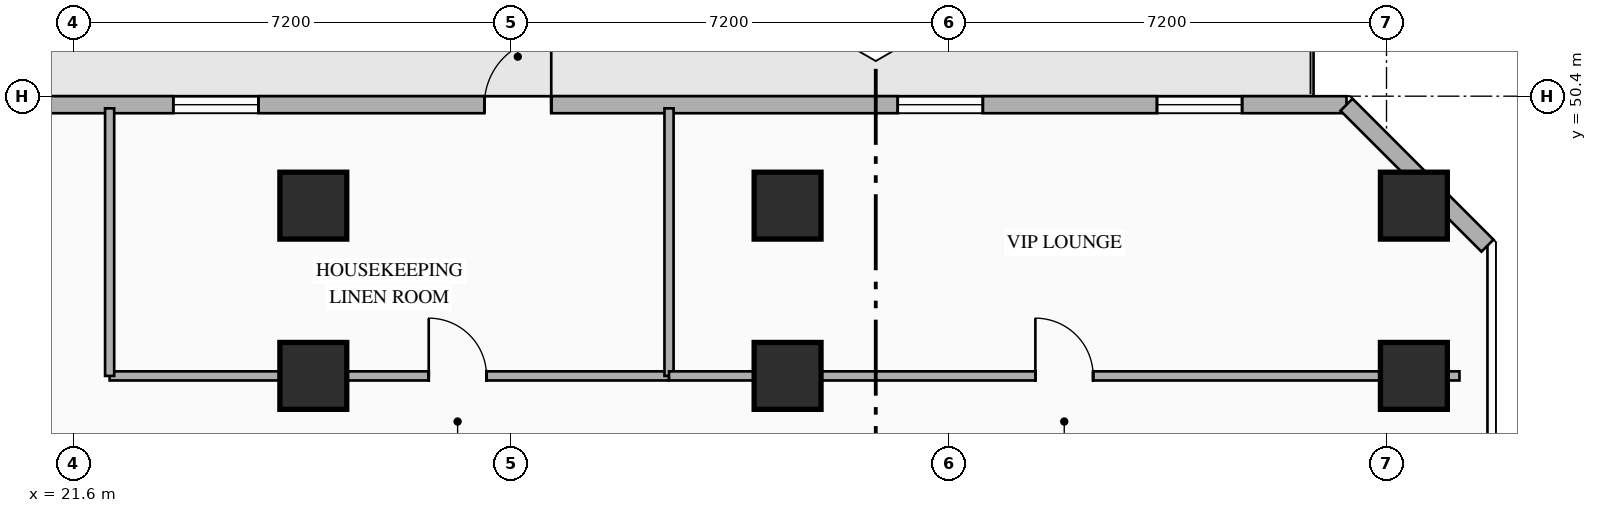
"""IFC4 building model, lengths in metres.
Left out: names, types, materials, properties, quantities, classifications, styles, units other than length and angle.
Written with IfcOpenShell. Run it as: python <this file> out.ifc"""

import sys

from ifc_helpers import new_model, si_unit, direction, frame, frame_2d, origin, origin_2d, place, context, subcontext, project, spatial, rectangle, hollow_rectangle, extrude, element, fill, save


model = new_model("IFC4")
c1 = context("Model", 3, precision=1e-05, world=origin(), true_north=direction((0.0, 1.0)))
c2 = subcontext(c1, "Body", "Model", "MODEL_VIEW")
j1 = project(units=[si_unit("LENGTHUNIT", "METRE"), si_unit("PLANEANGLEUNIT", "RADIAN")], contexts=[c1])
p1 = place(None, origin())
s1 = spatial("IfcSite", under=j1, at=p1, CompositionType="ELEMENT")
p2 = place(p1, origin())
s2 = spatial("IfcBuilding", under=s1, at=p2, CompositionType="ELEMENT")
p3 = place(p2, frame((0.0, 0.0, 36.6)))
s3 = spatial("IfcBuildingStorey", under=s2, at=p3, CompositionType="ELEMENT", Elevation=36.6)
for number, where, z_axis, x_axis in (
    (1, (25.55, 45.8, 0.0), (0.0, 0.0, 1.0), (1.0, 0.0, 0.0)),
    (2, (33.35, 45.8, 0.0), (0.0, 0.0, 1.0), (1.0, 0.0, 0.0)),
    (3, (43.65, 45.8, 0.0), (0.0, 0.0, 1.0), (1.0, 0.0, 0.0)),
    (4, (25.55, 48.6, 0.0), (0.0, 0.0, 1.0), (1.0, 0.0, 0.0)),
    (5, (33.35, 48.6, 0.0), (0.0, 0.0, 1.0), (1.0, 0.0, 0.0)),
    (6, (43.65, 48.6, 0.0), (0.0, 0.0, 1.0), (1.0, 0.0, 0.0)),
):
    element("IfcColumn", number, at=place(p3, frame(where, z_axis=z_axis, x_axis=x_axis)), inside=s3, PredefinedType="COLUMN", context=c2, shape_type="SweptSolid", body=[
        extrude(hollow_rectangle(XDim=1.1, YDim=1.1, WallThickness=0.04, at=origin_2d()), origin(), (0.0, 0.0, 1.0), 3.35),
    ])
p4 = place(p3, frame((2.458, 50.26, 0.0), z_axis=(0.0, 0.0, 1.0), x_axis=(1.0, 0.0, 0.0)))
e7 = element("IfcWall", 7, at=p4, inside=s3, PredefinedType="STANDARD", context=c2, shape_type="SweptSolid", body=[
    extrude(rectangle(XDim=40.084, YDim=0.28, at=frame_2d((20.042, 0.0))), origin(), (0.0, 0.0, 1.0), 3.13),
])
p5 = place(p4, frame((25.905, 0.0, 0.0)))
e8 = element("IfcOpeningElement", 8, at=p5, cuts=e7, PredefinedType="OPENING", context=c2, shape_type="SweptSolid", body=[
    extrude(rectangle(XDim=1.1, YDim=2.2, at=frame_2d((0.55, 1.1))), frame((0.0, 0.15, 0.0), z_axis=(0.0, -1.0, 0.0), x_axis=(1.0, 0.0, 0.0)), (0.0, 0.0, 1.0), 0.3),
])
p6 = place(p4, frame((1.717, 0.0, 0.85)))
e9 = element("IfcOpeningElement", 9, at=p6, cuts=e7, PredefinedType="OPENING", context=c2, shape_type="SweptSolid", body=[
    extrude(rectangle(XDim=1.4, YDim=1.8, at=frame_2d((0.7, 0.9))), frame((0.0, 0.15, 0.0), z_axis=(0.0, -1.0, 0.0), x_axis=(1.0, 0.0, 0.0)), (0.0, 0.0, 1.0), 0.3),
])
p7 = place(p4, frame((5.981, 0.0, 0.85)))
e10 = element("IfcOpeningElement", 10, at=p7, cuts=e7, PredefinedType="OPENING", context=c2, shape_type="SweptSolid", body=[
    extrude(rectangle(XDim=1.4, YDim=1.8, at=frame_2d((0.7, 0.9))), frame((0.0, 0.15, 0.0), z_axis=(0.0, -1.0, 0.0), x_axis=(1.0, 0.0, 0.0)), (0.0, 0.0, 1.0), 0.3),
])
p8 = place(p4, frame((11.261, 0.0, 0.85)))
e11 = element("IfcOpeningElement", 11, at=p8, cuts=e7, PredefinedType="OPENING", context=c2, shape_type="SweptSolid", body=[
    extrude(rectangle(XDim=1.4, YDim=1.8, at=frame_2d((0.7, 0.9))), frame((0.0, 0.15, 0.0), z_axis=(0.0, -1.0, 0.0), x_axis=(1.0, 0.0, 0.0)), (0.0, 0.0, 1.0), 0.3),
])
p9 = place(p4, frame((14.02, 0.0, 0.85)))
e12 = element("IfcOpeningElement", 12, at=p9, cuts=e7, PredefinedType="OPENING", context=c2, shape_type="SweptSolid", body=[
    extrude(rectangle(XDim=1.4, YDim=1.8, at=frame_2d((0.7, 0.9))), frame((0.0, 0.15, 0.0), z_axis=(0.0, -1.0, 0.0), x_axis=(1.0, 0.0, 0.0)), (0.0, 0.0, 1.0), 0.3),
])
p10 = place(p4, frame((20.789, 0.0, 0.85)))
e13 = element("IfcOpeningElement", 13, at=p10, cuts=e7, PredefinedType="OPENING", context=c2, shape_type="SweptSolid", body=[
    extrude(rectangle(XDim=1.4, YDim=1.8, at=frame_2d((0.7, 0.9))), frame((0.0, 0.15, 0.0), z_axis=(0.0, -1.0, 0.0), x_axis=(1.0, 0.0, 0.0)), (0.0, 0.0, 1.0), 0.3),
])
p11 = place(p4, frame((32.703, 0.0, 0.85)))
e14 = element("IfcOpeningElement", 14, at=p11, cuts=e7, PredefinedType="OPENING", context=c2, shape_type="SweptSolid", body=[
    extrude(rectangle(XDim=1.4, YDim=1.8, at=frame_2d((0.7, 0.9))), frame((0.0, 0.15, 0.0), z_axis=(0.0, -1.0, 0.0), x_axis=(1.0, 0.0, 0.0)), (0.0, 0.0, 1.0), 0.3),
])
p12 = place(p4, frame((36.967, 0.0, 0.85)))
e15 = element("IfcOpeningElement", 15, at=p12, cuts=e7, PredefinedType="OPENING", context=c2, shape_type="SweptSolid", body=[
    extrude(rectangle(XDim=1.4, YDim=1.8, at=frame_2d((0.7, 0.9))), frame((0.0, 0.15, 0.0), z_axis=(0.0, -1.0, 0.0), x_axis=(1.0, 0.0, 0.0)), (0.0, 0.0, 1.0), 0.3),
])
p13 = place(p3, frame((42.542, 50.26, 0.0), z_axis=(0.0, 0.0, 1.0), x_axis=(0.707106781187, -0.707106781187, 0.0)))
e16 = element("IfcWall", 16, at=p13, inside=s3, PredefinedType="STANDARD", context=c2, shape_type="SweptSolid", body=[
    extrude(rectangle(XDim=3.278, YDim=0.28, at=frame_2d((1.639, 0.0))), origin(), (0.0, 0.0, 1.0), 3.13),
])
p14 = place(p3, frame((22.2, 45.8, 0.0), z_axis=(0.0, 0.0, 1.0), x_axis=(1.0, 0.0, 0.0)))
e17 = element("IfcWall", 17, at=p14, inside=s3, PredefinedType="PARTITIONING", context=c2, shape_type="SweptSolid", body=[
    extrude(rectangle(XDim=9.2, YDim=0.15, at=frame_2d((4.6, 0.0))), origin(), (0.0, 0.0, 1.0), 2.425),
])
p15 = place(p14, frame((5.248, 0.0, 0.0)))
e18 = element("IfcOpeningElement", 18, at=p15, cuts=e17, PredefinedType="OPENING", context=c2, shape_type="SweptSolid", body=[
    extrude(rectangle(XDim=0.95, YDim=2.15, at=frame_2d((0.475, 1.075))), frame((0.0, 0.085, 0.0), z_axis=(0.0, -1.0, 0.0), x_axis=(1.0, 0.0, 0.0)), (0.0, 0.0, 1.0), 0.17),
])
for number, where, z_axis, x_axis in (
    (19, (22.2, 45.8, 0.0), (0.0, 0.0, 1.0), (0.0, 1.0, 0.0)),
    (20, (31.4, 45.8, 0.0), (0.0, 0.0, 1.0), (0.0, 1.0, 0.0)),
):
    element("IfcWall", number, at=place(p3, frame(where, z_axis=z_axis, x_axis=x_axis)), inside=s3, PredefinedType="PARTITIONING", context=c2, shape_type="SweptSolid", body=[
        extrude(rectangle(XDim=4.4, YDim=0.15, at=frame_2d((2.2, 0.0))), origin(), (0.0, 0.0, 1.0), 3.13),
    ])
p16 = place(p3, frame((31.4, 45.8, 0.0), z_axis=(0.0, 0.0, 1.0), x_axis=(1.0, 0.0, 0.0)))
e21 = element("IfcWall", 21, at=p16, inside=s3, PredefinedType="PARTITIONING", context=c2, shape_type="SweptSolid", body=[
    extrude(rectangle(XDim=13.0, YDim=0.15, at=frame_2d((6.5, 0.0))), origin(), (0.0, 0.0, 1.0), 2.425),
])
p17 = place(p16, frame((6.025, 0.0, 0.0)))
e22 = element("IfcOpeningElement", 22, at=p17, cuts=e21, PredefinedType="OPENING", context=c2, shape_type="SweptSolid", body=[
    extrude(rectangle(XDim=0.95, YDim=2.15, at=frame_2d((0.475, 1.075))), frame((0.0, 0.085, 0.0), z_axis=(0.0, -1.0, 0.0), x_axis=(1.0, 0.0, 0.0)), (0.0, 0.0, 1.0), 0.17),
])
p18 = place(p5, origin())
e23 = element("IfcDoor", 23, at=p18, inside=s3, OperationType="SINGLE_SWING_RIGHT", PredefinedType="DOOR", context=c2, shape_type="SweptSolid", body=[
    extrude(rectangle(XDim=1.1, YDim=2.2, at=frame_2d((0.55, 1.1))), frame((0.0, 0.025, 0.0), z_axis=(0.0, -1.0, 0.0), x_axis=(1.0, 0.0, 0.0)), (0.0, 0.0, 1.0), 0.05),
])
fill(e8, e23)
p19 = place(p10, origin())
e24 = element("IfcWindow", 24, at=p19, inside=s3, PartitioningType="SINGLE_PANEL", PredefinedType="WINDOW", context=c2, shape_type="SweptSolid", body=[
    extrude(rectangle(XDim=1.4, YDim=1.8, at=frame_2d((0.7, 0.9))), frame((0.0, 0.03, 0.0), z_axis=(0.0, -1.0, 0.0), x_axis=(1.0, 0.0, 0.0)), (0.0, 0.0, 1.0), 0.06),
])
fill(e13, e24)
p20 = place(p11, origin())
e25 = element("IfcWindow", 25, at=p20, inside=s3, PartitioningType="SINGLE_PANEL", PredefinedType="WINDOW", context=c2, shape_type="SweptSolid", body=[
    extrude(rectangle(XDim=1.4, YDim=1.8, at=frame_2d((0.7, 0.9))), frame((0.0, 0.03, 0.0), z_axis=(0.0, -1.0, 0.0), x_axis=(1.0, 0.0, 0.0)), (0.0, 0.0, 1.0), 0.06),
])
fill(e14, e25)
p21 = place(p12, origin())
e26 = element("IfcWindow", 26, at=p21, inside=s3, PartitioningType="SINGLE_PANEL", PredefinedType="WINDOW", context=c2, shape_type="SweptSolid", body=[
    extrude(rectangle(XDim=1.4, YDim=1.8, at=frame_2d((0.7, 0.9))), frame((0.0, 0.03, 0.0), z_axis=(0.0, -1.0, 0.0), x_axis=(1.0, 0.0, 0.0)), (0.0, 0.0, 1.0), 0.06),
])
fill(e15, e26)
p22 = place(p15, origin())
e27 = element("IfcDoor", 27, at=p22, inside=s3, OperationType="SINGLE_SWING_LEFT", PredefinedType="DOOR", context=c2, shape_type="SweptSolid", body=[
    extrude(rectangle(XDim=0.95, YDim=2.15, at=frame_2d((0.475, 1.075))), frame((0.0, 0.025, 0.0), z_axis=(0.0, -1.0, 0.0), x_axis=(1.0, 0.0, 0.0)), (0.0, 0.0, 1.0), 0.05),
])
fill(e18, e27)
p23 = place(p17, origin())
e28 = element("IfcDoor", 28, at=p23, inside=s3, OperationType="SINGLE_SWING_LEFT", PredefinedType="DOOR", context=c2, shape_type="SweptSolid", body=[
    extrude(rectangle(XDim=0.95, YDim=2.15, at=frame_2d((0.475, 1.075))), frame((0.0, 0.025, 0.0), z_axis=(0.0, -1.0, 0.0), x_axis=(1.0, 0.0, 0.0)), (0.0, 0.0, 1.0), 0.05),
])
fill(e22, e28)
save(model, sys.argv[1])
